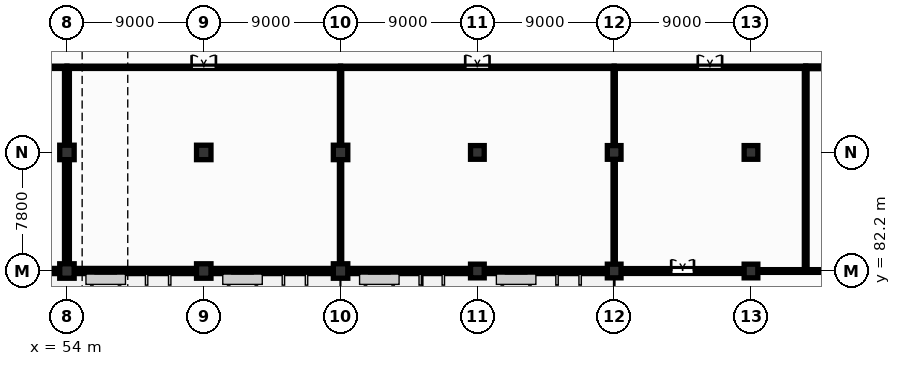
"""IFC4 building model, lengths in metres.
Left out: names, types, materials, properties, quantities, classifications, styles, units other than length and angle.
Written with IfcOpenShell. Run it as: python <this file> out.ifc"""

import sys

from ifc_helpers import new_model, si_unit, direction, frame, frame_2d, origin, origin_2d, place, context, subcontext, project, spatial, rectangle, extrude, element, fill, save


model = new_model("IFC4")
c1 = context("Model", 3, precision=1e-05, world=origin(), true_north=direction((0.0, 1.0)))
c2 = subcontext(c1, "Body", "Model", "MODEL_VIEW")
j1 = project(units=[si_unit("LENGTHUNIT", "METRE"), si_unit("PLANEANGLEUNIT", "RADIAN")], contexts=[c1])
p1 = place(None, origin())
s1 = spatial("IfcSite", under=j1, at=p1, CompositionType="ELEMENT")
p2 = place(p1, origin())
s2 = spatial("IfcBuilding", under=s1, at=p2, CompositionType="ELEMENT")
p3 = place(p2, origin())
s3 = spatial("IfcBuildingStorey", under=s2, at=p3, CompositionType="ELEMENT", Elevation=0.0)
for number, where, z_axis, x_axis in (
    (1, (54.0, 82.2, 0.0), (0.0, 0.0, 1.0), (1.0, 0.0, 0.0)),
    (2, (54.0, 90.0, 0.0), (0.0, 0.0, 1.0), (1.0, 0.0, 0.0)),
    (3, (63.0, 82.2, 0.0), (0.0, 0.0, 1.0), (1.0, 0.0, 0.0)),
    (4, (63.0, 90.0, 0.0), (0.0, 0.0, 1.0), (1.0, 0.0, 0.0)),
    (5, (72.0, 82.2, 0.0), (0.0, 0.0, 1.0), (1.0, 0.0, 0.0)),
    (6, (72.0, 90.0, 0.0), (0.0, 0.0, 1.0), (1.0, 0.0, 0.0)),
):
    element("IfcColumn", number, at=place(p3, frame(where, z_axis=z_axis, x_axis=x_axis)), inside=s3, PredefinedType="COLUMN", context=c2, shape_type="SweptSolid", body=[
        extrude(rectangle(XDim=0.95, YDim=0.95, at=origin_2d()), origin(), (0.0, 0.0, 1.0), 5.1),
    ])
for number, where, z_axis, x_axis in (
    (7, (81.0, 82.2, 0.0), (0.0, 0.0, 1.0), (1.0, 0.0, 0.0)),
    (8, (81.0, 90.0, 0.0), (0.0, 0.0, 1.0), (1.0, 0.0, 0.0)),
    (9, (90.0, 82.2, 0.0), (0.0, 0.0, 1.0), (1.0, 0.0, 0.0)),
    (10, (90.0, 90.0, 0.0), (0.0, 0.0, 1.0), (1.0, 0.0, 0.0)),
    (11, (99.0, 82.2, 0.0), (0.0, 0.0, 1.0), (1.0, 0.0, 0.0)),
    (12, (99.0, 90.0, 0.0), (0.0, 0.0, 1.0), (1.0, 0.0, 0.0)),
):
    element("IfcColumn", number, at=place(p3, frame(where, z_axis=z_axis, x_axis=x_axis)), inside=s3, PredefinedType="COLUMN", context=c2, shape_type="SweptSolid", body=[
        extrude(rectangle(XDim=0.9, YDim=0.9, at=origin_2d()), origin(), (0.0, 0.0, 1.0), 5.1),
    ])
p4 = place(p3, frame((45.0, 82.2, 0.0), z_axis=(0.0, 0.0, 1.0), x_axis=(1.0, 0.0, 0.0)))
e13 = element("IfcWall", 13, at=p4, inside=s3, PredefinedType="SOLIDWALL", context=c2, shape_type="SweptSolid", body=[
    extrude(rectangle(XDim=9.0, YDim=0.34, at=frame_2d((4.5, 0.0))), origin(), (0.0, 0.0, 1.0), 4.8),
])
p5 = place(p4, frame((3.6, 0.0, 0.0)))
e14 = element("IfcOpeningElement", 14, at=p5, cuts=e13, PredefinedType="OPENING", context=c2, shape_type="SweptSolid", body=[
    extrude(rectangle(XDim=1.8, YDim=2.4, at=frame_2d((0.9, 1.2))), frame((0.0, 0.18, 0.0), z_axis=(0.0, -1.0, 0.0), x_axis=(1.0, 0.0, 0.0)), (0.0, 0.0, 1.0), 0.36),
])
p6 = place(p3, frame((54.0, 82.2, 0.0), z_axis=(0.0, 0.0, 1.0), x_axis=(1.0, 0.0, 0.0)))
e15 = element("IfcWall", 15, at=p6, inside=s3, PredefinedType="SOLIDWALL", context=c2, shape_type="SweptSolid", body=[
    extrude(rectangle(XDim=9.0, YDim=0.34, at=frame_2d((4.5, 0.0))), origin(), (0.0, 0.0, 1.0), 4.8),
])
p7 = place(p6, frame((1.8, 0.0, 0.85)))
e16 = element("IfcOpeningElement", 16, at=p7, cuts=e15, PredefinedType="OPENING", context=c2, shape_type="SweptSolid", body=[
    extrude(rectangle(XDim=1.5, YDim=2.1, at=frame_2d((0.75, 1.05))), frame((0.0, 0.18, 0.0), z_axis=(0.0, -1.0, 0.0), x_axis=(1.0, 0.0, 0.0)), (0.0, 0.0, 1.0), 0.36),
])
p8 = place(p6, frame((5.4, 0.0, 0.85)))
e17 = element("IfcOpeningElement", 17, at=p8, cuts=e15, PredefinedType="OPENING", context=c2, shape_type="SweptSolid", body=[
    extrude(rectangle(XDim=1.2, YDim=2.1, at=frame_2d((0.6, 1.05))), frame((0.0, 0.18, 0.0), z_axis=(0.0, -1.0, 0.0), x_axis=(1.0, 0.0, 0.0)), (0.0, 0.0, 1.0), 0.36),
])
p9 = place(p3, frame((63.0, 82.2, 0.0), z_axis=(0.0, 0.0, 1.0), x_axis=(1.0, 0.0, 0.0)))
e18 = element("IfcWall", 18, at=p9, inside=s3, PredefinedType="SOLIDWALL", context=c2, shape_type="SweptSolid", body=[
    extrude(rectangle(XDim=9.0, YDim=0.34, at=frame_2d((4.5, 0.0))), origin(), (0.0, 0.0, 1.0), 4.8),
])
p10 = place(p9, frame((1.8, 0.0, 0.85)))
e19 = element("IfcOpeningElement", 19, at=p10, cuts=e18, PredefinedType="OPENING", context=c2, shape_type="SweptSolid", body=[
    extrude(rectangle(XDim=1.5, YDim=2.1, at=frame_2d((0.75, 1.05))), frame((0.0, 0.18, 0.0), z_axis=(0.0, -1.0, 0.0), x_axis=(1.0, 0.0, 0.0)), (0.0, 0.0, 1.0), 0.36),
])
p11 = place(p9, frame((5.4, 0.0, 0.85)))
e20 = element("IfcOpeningElement", 20, at=p11, cuts=e18, PredefinedType="OPENING", context=c2, shape_type="SweptSolid", body=[
    extrude(rectangle(XDim=1.2, YDim=2.1, at=frame_2d((0.6, 1.05))), frame((0.0, 0.18, 0.0), z_axis=(0.0, -1.0, 0.0), x_axis=(1.0, 0.0, 0.0)), (0.0, 0.0, 1.0), 0.36),
])
p12 = place(p3, frame((72.0, 82.2, 0.0), z_axis=(0.0, 0.0, 1.0), x_axis=(1.0, 0.0, 0.0)))
e21 = element("IfcWall", 21, at=p12, inside=s3, PredefinedType="SOLIDWALL", context=c2, shape_type="SweptSolid", body=[
    extrude(rectangle(XDim=9.0, YDim=0.34, at=frame_2d((4.5, 0.0))), origin(), (0.0, 0.0, 1.0), 4.8),
])
p13 = place(p12, frame((1.8, 0.0, 0.85)))
e22 = element("IfcOpeningElement", 22, at=p13, cuts=e21, PredefinedType="OPENING", context=c2, shape_type="SweptSolid", body=[
    extrude(rectangle(XDim=1.5, YDim=2.1, at=frame_2d((0.75, 1.05))), frame((0.0, 0.18, 0.0), z_axis=(0.0, -1.0, 0.0), x_axis=(1.0, 0.0, 0.0)), (0.0, 0.0, 1.0), 0.36),
])
p14 = place(p12, frame((5.4, 0.0, 0.85)))
e23 = element("IfcOpeningElement", 23, at=p14, cuts=e21, PredefinedType="OPENING", context=c2, shape_type="SweptSolid", body=[
    extrude(rectangle(XDim=1.2, YDim=2.1, at=frame_2d((0.6, 1.05))), frame((0.0, 0.18, 0.0), z_axis=(0.0, -1.0, 0.0), x_axis=(1.0, 0.0, 0.0)), (0.0, 0.0, 1.0), 0.36),
])
p15 = place(p3, frame((81.0, 82.2, 0.0), z_axis=(0.0, 0.0, 1.0), x_axis=(1.0, 0.0, 0.0)))
e24 = element("IfcWall", 24, at=p15, inside=s3, PredefinedType="SOLIDWALL", context=c2, shape_type="SweptSolid", body=[
    extrude(rectangle(XDim=9.0, YDim=0.34, at=frame_2d((4.5, 0.0))), origin(), (0.0, 0.0, 1.0), 4.8),
])
p16 = place(p15, frame((1.8, 0.0, 0.85)))
e25 = element("IfcOpeningElement", 25, at=p16, cuts=e24, PredefinedType="OPENING", context=c2, shape_type="SweptSolid", body=[
    extrude(rectangle(XDim=1.5, YDim=2.1, at=frame_2d((0.75, 1.05))), frame((0.0, 0.18, 0.0), z_axis=(0.0, -1.0, 0.0), x_axis=(1.0, 0.0, 0.0)), (0.0, 0.0, 1.0), 0.36),
])
p17 = place(p15, frame((5.4, 0.0, 0.85)))
e26 = element("IfcOpeningElement", 26, at=p17, cuts=e24, PredefinedType="OPENING", context=c2, shape_type="SweptSolid", body=[
    extrude(rectangle(XDim=1.2, YDim=2.1, at=frame_2d((0.6, 1.05))), frame((0.0, 0.18, 0.0), z_axis=(0.0, -1.0, 0.0), x_axis=(1.0, 0.0, 0.0)), (0.0, 0.0, 1.0), 0.36),
])
p18 = place(p3, frame((90.0, 82.2, 0.0), z_axis=(0.0, 0.0, 1.0), x_axis=(1.0, 0.0, 0.0)))
e27 = element("IfcWall", 27, at=p18, inside=s3, PredefinedType="SHEAR", context=c2, shape_type="SweptSolid", body=[
    extrude(rectangle(XDim=9.0, YDim=0.32, at=frame_2d((4.5, 0.0))), origin(), (0.0, 0.0, 1.0), 4.8),
])
p19 = place(p18, frame((3.75, 0.0, 0.0)))
e28 = element("IfcOpeningElement", 28, at=p19, cuts=e27, PredefinedType="OPENING", context=c2, shape_type="SweptSolid", body=[
    extrude(rectangle(XDim=1.5, YDim=2.2, at=frame_2d((0.75, 1.1))), frame((0.0, 0.17, 0.0), z_axis=(0.0, -1.0, 0.0), x_axis=(1.0, 0.0, 0.0)), (0.0, 0.0, 1.0), 0.34),
])
p20 = place(p3, frame((36.0, 95.6, 0.0), z_axis=(0.0, 0.0, 1.0), x_axis=(1.0, 0.0, 0.0)))
e29 = element("IfcWall", 29, at=p20, inside=s3, PredefinedType="PARTITIONING", context=c2, shape_type="SweptSolid", body=[
    extrude(rectangle(XDim=18.0, YDim=0.15, at=frame_2d((9.0, 0.0))), origin(), (0.0, 0.0, 1.0), 3.995),
])
p21 = place(p20, frame((8.2, 0.0, 0.0)))
e30 = element("IfcOpeningElement", 30, at=p21, cuts=e29, PredefinedType="OPENING", context=c2, shape_type="SweptSolid", body=[
    extrude(rectangle(XDim=1.6, YDim=2.2, at=frame_2d((0.8, 1.1))), frame((0.0, 0.085, 0.0), z_axis=(0.0, -1.0, 0.0), x_axis=(1.0, 0.0, 0.0)), (0.0, 0.0, 1.0), 0.17),
])
p22 = place(p3, frame((54.0, 95.6, 0.0), z_axis=(0.0, 0.0, 1.0), x_axis=(1.0, 0.0, 0.0)))
e31 = element("IfcWall", 31, at=p22, inside=s3, PredefinedType="PARTITIONING", context=c2, shape_type="SweptSolid", body=[
    extrude(rectangle(XDim=18.0, YDim=0.15, at=frame_2d((9.0, 0.0))), origin(), (0.0, 0.0, 1.0), 3.995),
])
p23 = place(p22, frame((8.2, 0.0, 0.0)))
e32 = element("IfcOpeningElement", 32, at=p23, cuts=e31, PredefinedType="OPENING", context=c2, shape_type="SweptSolid", body=[
    extrude(rectangle(XDim=1.6, YDim=2.2, at=frame_2d((0.8, 1.1))), frame((0.0, 0.085, 0.0), z_axis=(0.0, -1.0, 0.0), x_axis=(1.0, 0.0, 0.0)), (0.0, 0.0, 1.0), 0.17),
])
p24 = place(p3, frame((54.0, 82.2, 0.0), z_axis=(0.0, 0.0, 1.0), x_axis=(0.0, 1.0, 0.0)))
e33 = element("IfcWall", 33, at=p24, inside=s3, PredefinedType="SHEAR", context=c2, shape_type="SweptSolid", body=[
    extrude(rectangle(XDim=13.4, YDim=0.32, at=frame_2d((6.7, 0.0))), origin(), (0.0, 0.0, 1.0), 4.8),
])
p25 = place(p3, frame((72.0, 95.6, 0.0), z_axis=(0.0, 0.0, 1.0), x_axis=(1.0, 0.0, 0.0)))
e34 = element("IfcWall", 34, at=p25, inside=s3, PredefinedType="PARTITIONING", context=c2, shape_type="SweptSolid", body=[
    extrude(rectangle(XDim=18.0, YDim=0.15, at=frame_2d((9.0, 0.0))), origin(), (0.0, 0.0, 1.0), 3.995),
])
p26 = place(p25, frame((8.2, 0.0, 0.0)))
e35 = element("IfcOpeningElement", 35, at=p26, cuts=e34, PredefinedType="OPENING", context=c2, shape_type="SweptSolid", body=[
    extrude(rectangle(XDim=1.6, YDim=2.2, at=frame_2d((0.8, 1.1))), frame((0.0, 0.085, 0.0), z_axis=(0.0, -1.0, 0.0), x_axis=(1.0, 0.0, 0.0)), (0.0, 0.0, 1.0), 0.17),
])
p27 = place(p3, frame((72.0, 82.2, 0.0), z_axis=(0.0, 0.0, 1.0), x_axis=(0.0, 1.0, 0.0)))
e36 = element("IfcWall", 36, at=p27, inside=s3, PredefinedType="PARTITIONING", context=c2, shape_type="SweptSolid", body=[
    extrude(rectangle(XDim=13.4, YDim=0.15, at=frame_2d((6.7, 0.0))), origin(), (0.0, 0.0, 1.0), 4.095),
])
p28 = place(p3, frame((90.0, 95.6, 0.0), z_axis=(0.0, 0.0, 1.0), x_axis=(1.0, 0.0, 0.0)))
e37 = element("IfcWall", 37, at=p28, inside=s3, PredefinedType="PARTITIONING", context=c2, shape_type="SweptSolid", body=[
    extrude(rectangle(XDim=12.6, YDim=0.15, at=frame_2d((6.3, 0.0))), origin(), (0.0, 0.0, 1.0), 4.8),
])
p29 = place(p28, frame((5.5, 0.0, 0.0)))
e38 = element("IfcOpeningElement", 38, at=p29, cuts=e37, PredefinedType="OPENING", context=c2, shape_type="SweptSolid", body=[
    extrude(rectangle(XDim=1.6, YDim=2.2, at=frame_2d((0.8, 1.1))), frame((0.0, 0.085, 0.0), z_axis=(0.0, -1.0, 0.0), x_axis=(1.0, 0.0, 0.0)), (0.0, 0.0, 1.0), 0.17),
])
p30 = place(p3, frame((90.0, 82.2, 0.0), z_axis=(0.0, 0.0, 1.0), x_axis=(0.0, 1.0, 0.0)))
e39 = element("IfcWall", 39, at=p30, inside=s3, PredefinedType="PARTITIONING", context=c2, shape_type="SweptSolid", body=[
    extrude(rectangle(XDim=13.4, YDim=0.15, at=frame_2d((6.7, 0.0))), origin(), (0.0, 0.0, 1.0), 4.095),
])
p31 = place(p3, frame((102.6, 95.6, 0.0), z_axis=(0.0, 0.0, 1.0), x_axis=(1.0, 0.0, 0.0)))
e40 = element("IfcWall", 40, at=p31, inside=s3, PredefinedType="PLUMBINGWALL", context=c2, shape_type="SweptSolid", body=[
    extrude(rectangle(XDim=4.4, YDim=0.18, at=frame_2d((2.2, 0.0))), origin(), (0.0, 0.0, 1.0), 4.8),
])
p32 = place(p31, frame((1.725, 0.0, 0.0)))
e41 = element("IfcOpeningElement", 41, at=p32, cuts=e40, PredefinedType="OPENING", context=c2, shape_type="SweptSolid", body=[
    extrude(rectangle(XDim=0.95, YDim=2.15, at=frame_2d((0.475, 1.075))), frame((0.0, 0.1, 0.0), z_axis=(0.0, -1.0, 0.0), x_axis=(1.0, 0.0, 0.0)), (0.0, 0.0, 1.0), 0.2),
])
p33 = place(p3, frame((102.6, 82.2, 0.0), z_axis=(0.0, 0.0, 1.0), x_axis=(0.0, 1.0, 0.0)))
e42 = element("IfcWall", 42, at=p33, inside=s3, PredefinedType="PLUMBINGWALL", context=c2, shape_type="SweptSolid", body=[
    extrude(rectangle(XDim=13.4, YDim=0.18, at=frame_2d((6.7, 0.0))), origin(), (0.0, 0.0, 1.0), 4.8),
])
p34 = place(p3, frame((99.0, 82.2, 0.0), z_axis=(0.0, 0.0, 1.0), x_axis=(1.0, 0.0, 0.0)))
e43 = element("IfcWall", 43, at=p34, inside=s3, PredefinedType="PLUMBINGWALL", context=c2, shape_type="SweptSolid", body=[
    extrude(rectangle(XDim=16.6, YDim=0.18, at=frame_2d((8.3, 0.0))), origin(), (0.0, 0.0, 1.0), 4.153),
])
p35 = place(p7, origin())
e44 = element("IfcWindow", 44, at=p35, inside=s3, PartitioningType="SINGLE_PANEL", PredefinedType="WINDOW", context=c2, shape_type="SweptSolid", body=[
    extrude(rectangle(XDim=1.5, YDim=2.1, at=frame_2d((0.75, 1.05))), frame((0.0, 0.03, 0.0), z_axis=(0.0, -1.0, 0.0), x_axis=(1.0, 0.0, 0.0)), (0.0, 0.0, 1.0), 0.06),
])
fill(e16, e44)
p36 = place(p8, origin())
e45 = element("IfcWindow", 45, at=p36, inside=s3, PartitioningType="SINGLE_PANEL", PredefinedType="WINDOW", context=c2, shape_type="SweptSolid", body=[
    extrude(rectangle(XDim=1.2, YDim=2.1, at=frame_2d((0.6, 1.05))), frame((0.0, 0.03, 0.0), z_axis=(0.0, -1.0, 0.0), x_axis=(1.0, 0.0, 0.0)), (0.0, 0.0, 1.0), 0.06),
])
fill(e17, e45)
p37 = place(p10, origin())
e46 = element("IfcWindow", 46, at=p37, inside=s3, PartitioningType="SINGLE_PANEL", PredefinedType="WINDOW", context=c2, shape_type="SweptSolid", body=[
    extrude(rectangle(XDim=1.5, YDim=2.1, at=frame_2d((0.75, 1.05))), frame((0.0, 0.03, 0.0), z_axis=(0.0, -1.0, 0.0), x_axis=(1.0, 0.0, 0.0)), (0.0, 0.0, 1.0), 0.06),
])
fill(e19, e46)
p38 = place(p11, origin())
e47 = element("IfcWindow", 47, at=p38, inside=s3, PartitioningType="SINGLE_PANEL", PredefinedType="WINDOW", context=c2, shape_type="SweptSolid", body=[
    extrude(rectangle(XDim=1.2, YDim=2.1, at=frame_2d((0.6, 1.05))), frame((0.0, 0.03, 0.0), z_axis=(0.0, -1.0, 0.0), x_axis=(1.0, 0.0, 0.0)), (0.0, 0.0, 1.0), 0.06),
])
fill(e20, e47)
p39 = place(p13, origin())
e48 = element("IfcWindow", 48, at=p39, inside=s3, PartitioningType="SINGLE_PANEL", PredefinedType="WINDOW", context=c2, shape_type="SweptSolid", body=[
    extrude(rectangle(XDim=1.5, YDim=2.1, at=frame_2d((0.75, 1.05))), frame((0.0, 0.03, 0.0), z_axis=(0.0, -1.0, 0.0), x_axis=(1.0, 0.0, 0.0)), (0.0, 0.0, 1.0), 0.06),
])
fill(e22, e48)
p40 = place(p14, origin())
e49 = element("IfcWindow", 49, at=p40, inside=s3, PartitioningType="SINGLE_PANEL", PredefinedType="WINDOW", context=c2, shape_type="SweptSolid", body=[
    extrude(rectangle(XDim=1.2, YDim=2.1, at=frame_2d((0.6, 1.05))), frame((0.0, 0.03, 0.0), z_axis=(0.0, -1.0, 0.0), x_axis=(1.0, 0.0, 0.0)), (0.0, 0.0, 1.0), 0.06),
])
fill(e23, e49)
p41 = place(p16, origin())
e50 = element("IfcWindow", 50, at=p41, inside=s3, PartitioningType="SINGLE_PANEL", PredefinedType="WINDOW", context=c2, shape_type="SweptSolid", body=[
    extrude(rectangle(XDim=1.5, YDim=2.1, at=frame_2d((0.75, 1.05))), frame((0.0, 0.03, 0.0), z_axis=(0.0, -1.0, 0.0), x_axis=(1.0, 0.0, 0.0)), (0.0, 0.0, 1.0), 0.06),
])
fill(e25, e50)
p42 = place(p17, origin())
e51 = element("IfcWindow", 51, at=p42, inside=s3, PartitioningType="SINGLE_PANEL", PredefinedType="WINDOW", context=c2, shape_type="SweptSolid", body=[
    extrude(rectangle(XDim=1.2, YDim=2.1, at=frame_2d((0.6, 1.05))), frame((0.0, 0.03, 0.0), z_axis=(0.0, -1.0, 0.0), x_axis=(1.0, 0.0, 0.0)), (0.0, 0.0, 1.0), 0.06),
])
fill(e26, e51)
p43 = place(p19, origin())
e52 = element("IfcDoor", 52, at=p43, inside=s3, OperationType="DOUBLE_DOOR_SINGLE_SWING", PredefinedType="DOOR", context=c2, shape_type="SweptSolid", body=[
    extrude(rectangle(XDim=1.5, YDim=2.2, at=frame_2d((0.75, 1.1))), frame((0.0, 0.025, 0.0), z_axis=(0.0, -1.0, 0.0), x_axis=(1.0, 0.0, 0.0)), (0.0, 0.0, 1.0), 0.05),
])
fill(e28, e52)
p44 = place(p23, origin())
e53 = element("IfcDoor", 53, at=p44, inside=s3, OperationType="DOUBLE_DOOR_SINGLE_SWING", PredefinedType="DOOR", context=c2, shape_type="SweptSolid", body=[
    extrude(rectangle(XDim=1.6, YDim=2.2, at=frame_2d((0.8, 1.1))), frame((0.0, 0.025, 0.0), z_axis=(0.0, -1.0, 0.0), x_axis=(1.0, 0.0, 0.0)), (0.0, 0.0, 1.0), 0.05),
])
fill(e32, e53)
p45 = place(p26, origin())
e54 = element("IfcDoor", 54, at=p45, inside=s3, OperationType="DOUBLE_DOOR_SINGLE_SWING", PredefinedType="DOOR", context=c2, shape_type="SweptSolid", body=[
    extrude(rectangle(XDim=1.6, YDim=2.2, at=frame_2d((0.8, 1.1))), frame((0.0, 0.025, 0.0), z_axis=(0.0, -1.0, 0.0), x_axis=(1.0, 0.0, 0.0)), (0.0, 0.0, 1.0), 0.05),
])
fill(e35, e54)
p46 = place(p29, origin())
e55 = element("IfcDoor", 55, at=p46, inside=s3, OperationType="DOUBLE_DOOR_SINGLE_SWING", PredefinedType="DOOR", context=c2, shape_type="SweptSolid", body=[
    extrude(rectangle(XDim=1.6, YDim=2.2, at=frame_2d((0.8, 1.1))), frame((0.0, 0.025, 0.0), z_axis=(0.0, -1.0, 0.0), x_axis=(1.0, 0.0, 0.0)), (0.0, 0.0, 1.0), 0.05),
])
fill(e38, e55)
save(model, sys.argv[1])
